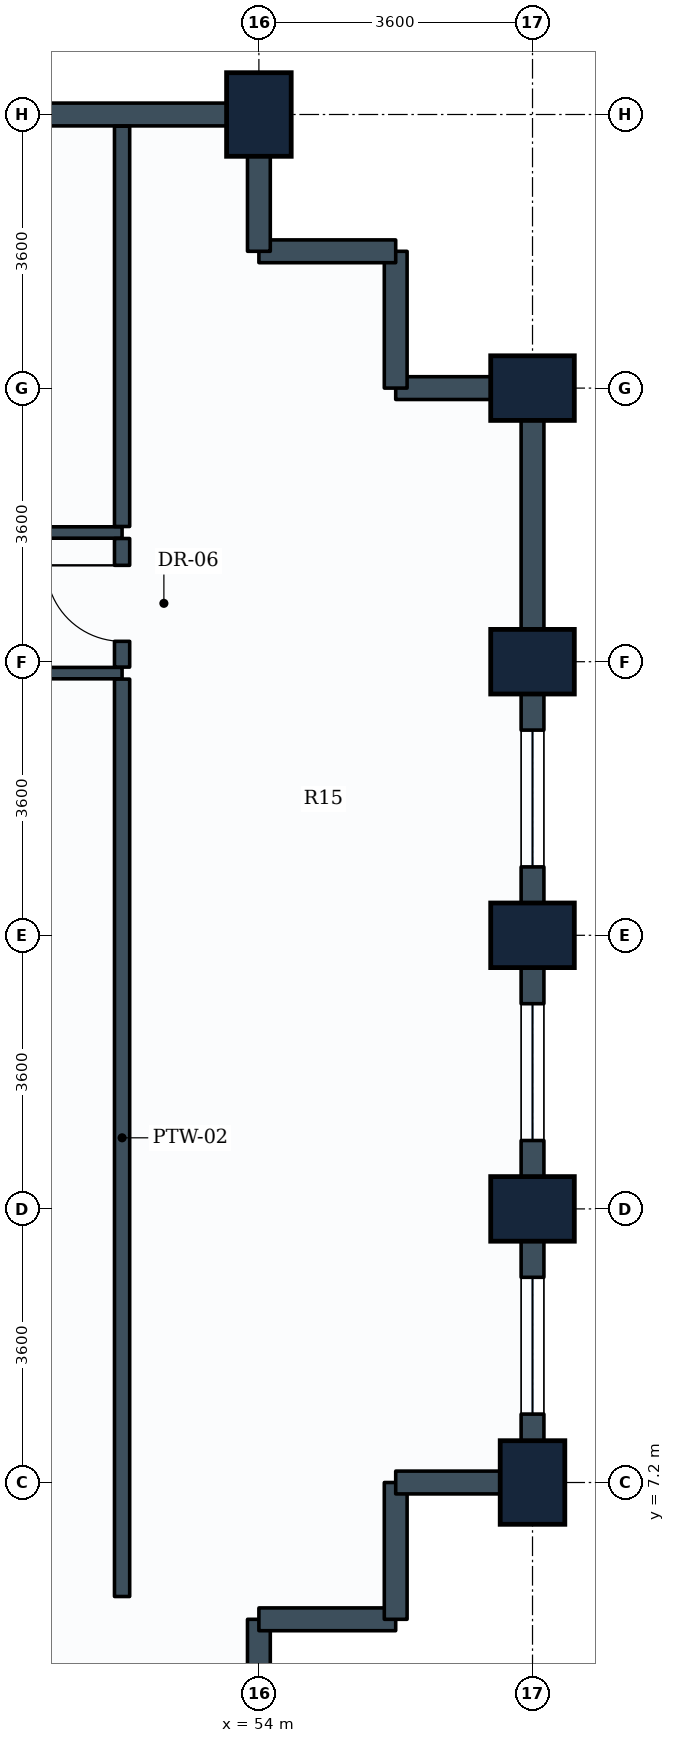
"""IFC4 building model, lengths in metres.
Left out: names, types, materials, properties, quantities, classifications, styles, units other than length and angle.
Written with IfcOpenShell. Run it as: python <this file> out.ifc"""

import sys

from ifc_helpers import new_model, si_unit, direction, frame, frame_2d, origin, origin_2d, place, context, subcontext, project, spatial, rectangle, extrude, element, fill, save


model = new_model("IFC4")
c1 = context("Model", 3, precision=1e-05, world=origin(), true_north=direction((0.0, 1.0)))
c2 = subcontext(c1, "Body", "Model", "MODEL_VIEW")
j1 = project(units=[si_unit("LENGTHUNIT", "METRE"), si_unit("PLANEANGLEUNIT", "RADIAN")], contexts=[c1])
p1 = place(None, origin())
s1 = spatial("IfcSite", under=j1, at=p1, CompositionType="ELEMENT")
p2 = place(p1, origin())
s2 = spatial("IfcBuilding", under=s1, at=p2, CompositionType="ELEMENT")
p3 = place(p2, frame((0.0, 0.0, 95.7)))
s3 = spatial("IfcBuildingStorey", under=s2, at=p3, CompositionType="ELEMENT", Elevation=95.7)
for number, where, z_axis, x_axis in (
    (1, (54.0, 25.2, 0.0), (0.0, 0.0, 1.0), (1.0, 0.0, 0.0)),
    (2, (57.6, 7.2, 0.0), (0.0, 0.0, 1.0), (1.0, 0.0, 0.0)),
    (3, (57.6, 10.8, 0.0), (0.0, 0.0, 1.0), (0.0, 1.0, 0.0)),
    (4, (57.6, 14.4, 0.0), (0.0, 0.0, 1.0), (0.0, 1.0, 0.0)),
    (5, (57.6, 18.0, 0.0), (0.0, 0.0, 1.0), (0.0, 1.0, 0.0)),
    (6, (57.6, 21.6, 0.0), (0.0, 0.0, 1.0), (0.0, 1.0, 0.0)),
):
    element("IfcColumn", number, at=place(p3, frame(where, z_axis=z_axis, x_axis=x_axis)), inside=s3, PredefinedType="COLUMN", context=c2, shape_type="SweptSolid", body=[
        extrude(rectangle(XDim=0.85, YDim=1.1, at=origin_2d()), origin(), (0.0, 0.0, 1.0), 3.9),
    ])
p4 = place(p3, frame((54.0, 5.4, 0.0), z_axis=(0.0, 0.0, 1.0), x_axis=(0.0, -1.0, 0.0)))
e7 = element("IfcWall", 7, at=p4, inside=s3, PredefinedType="STANDARD", context=c2, shape_type="SweptSolid", body=[
    extrude(rectangle(XDim=1.8, YDim=0.3, at=frame_2d((0.9, 0.0))), origin(), (0.0, 0.0, 1.0), 2.93),
])
for number, where, z_axis, x_axis in (
    (8, (55.8, 5.4, 0.0), (0.0, 0.0, 1.0), (-1.0, 0.0, 0.0)),
    (9, (55.8, 7.2, 0.0), (0.0, 0.0, 1.0), (0.0, -1.0, 0.0)),
):
    element("IfcWall", number, at=place(p3, frame(where, z_axis=z_axis, x_axis=x_axis)), inside=s3, PredefinedType="STANDARD", context=c2, shape_type="SweptSolid", body=[
        extrude(rectangle(XDim=1.8, YDim=0.3, at=frame_2d((0.9, 0.0))), origin(), (0.0, 0.0, 1.0), 3.635),
    ])
p5 = place(p3, frame((57.6, 7.2, 0.0), z_axis=(0.0, 0.0, 1.0), x_axis=(-1.0, 0.0, 0.0)))
e10 = element("IfcWall", 10, at=p5, inside=s3, PredefinedType="STANDARD", context=c2, shape_type="SweptSolid", body=[
    extrude(rectangle(XDim=1.8, YDim=0.3, at=frame_2d((0.9, 0.0))), origin(), (0.0, 0.0, 1.0), 2.93),
])
p6 = place(p3, frame((57.6, 10.8, 0.0), z_axis=(0.0, 0.0, 1.0), x_axis=(0.0, -1.0, 0.0)))
e11 = element("IfcWall", 11, at=p6, inside=s3, PredefinedType="STANDARD", context=c2, shape_type="SweptSolid", body=[
    extrude(rectangle(XDim=3.6, YDim=0.3, at=frame_2d((1.8, 0.0))), origin(), (0.0, 0.0, 1.0), 2.93),
])
p7 = place(p6, frame((0.9, 0.0, 0.85)))
e12 = element("IfcOpeningElement", 12, at=p7, cuts=e11, PredefinedType="OPENING", context=c2, shape_type="SweptSolid", body=[
    extrude(rectangle(XDim=1.8, YDim=1.35, at=frame_2d((0.9, 0.675))), frame((0.0, 0.16, 0.0), z_axis=(0.0, -1.0, 0.0), x_axis=(1.0, 0.0, 0.0)), (0.0, 0.0, 1.0), 0.32),
])
p8 = place(p3, frame((57.6, 14.4, 0.0), z_axis=(0.0, 0.0, 1.0), x_axis=(0.0, -1.0, 0.0)))
e13 = element("IfcWall", 13, at=p8, inside=s3, PredefinedType="STANDARD", context=c2, shape_type="SweptSolid", body=[
    extrude(rectangle(XDim=3.6, YDim=0.3, at=frame_2d((1.8, 0.0))), origin(), (0.0, 0.0, 1.0), 2.93),
])
p9 = place(p8, frame((0.9, 0.0, 0.85)))
e14 = element("IfcOpeningElement", 14, at=p9, cuts=e13, PredefinedType="OPENING", context=c2, shape_type="SweptSolid", body=[
    extrude(rectangle(XDim=1.8, YDim=1.35, at=frame_2d((0.9, 0.675))), frame((0.0, 0.16, 0.0), z_axis=(0.0, -1.0, 0.0), x_axis=(1.0, 0.0, 0.0)), (0.0, 0.0, 1.0), 0.32),
])
p10 = place(p3, frame((57.6, 18.0, 0.0), z_axis=(0.0, 0.0, 1.0), x_axis=(0.0, -1.0, 0.0)))
e15 = element("IfcWall", 15, at=p10, inside=s3, PredefinedType="STANDARD", context=c2, shape_type="SweptSolid", body=[
    extrude(rectangle(XDim=3.6, YDim=0.3, at=frame_2d((1.8, 0.0))), origin(), (0.0, 0.0, 1.0), 2.93),
])
p11 = place(p10, frame((0.9, 0.0, 0.85)))
e16 = element("IfcOpeningElement", 16, at=p11, cuts=e15, PredefinedType="OPENING", context=c2, shape_type="SweptSolid", body=[
    extrude(rectangle(XDim=1.8, YDim=1.35, at=frame_2d((0.9, 0.675))), frame((0.0, 0.16, 0.0), z_axis=(0.0, -1.0, 0.0), x_axis=(1.0, 0.0, 0.0)), (0.0, 0.0, 1.0), 0.32),
])
p12 = place(p3, frame((57.6, 21.6, 0.0), z_axis=(0.0, 0.0, 1.0), x_axis=(0.0, -1.0, 0.0)))
e17 = element("IfcWall", 17, at=p12, inside=s3, PredefinedType="STANDARD", context=c2, shape_type="SweptSolid", body=[
    extrude(rectangle(XDim=3.6, YDim=0.3, at=frame_2d((1.8, 0.0))), origin(), (0.0, 0.0, 1.0), 2.93),
])
p13 = place(p3, frame((55.8, 21.6, 0.0), z_axis=(0.0, 0.0, 1.0), x_axis=(1.0, 0.0, 0.0)))
e18 = element("IfcWall", 18, at=p13, inside=s3, PredefinedType="STANDARD", context=c2, shape_type="SweptSolid", body=[
    extrude(rectangle(XDim=1.8, YDim=0.3, at=frame_2d((0.9, 0.0))), origin(), (0.0, 0.0, 1.0), 2.93),
])
p14 = place(p3, frame((55.8, 23.4, 0.0), z_axis=(0.0, 0.0, 1.0), x_axis=(0.0, -1.0, 0.0)))
e19 = element("IfcWall", 19, at=p14, inside=s3, PredefinedType="STANDARD", context=c2, shape_type="SweptSolid", body=[
    extrude(rectangle(XDim=1.8, YDim=0.3, at=frame_2d((0.9, 0.0))), origin(), (0.0, 0.0, 1.0), 3.635),
])
p15 = place(p3, frame((54.0, 23.4, 0.0), z_axis=(0.0, 0.0, 1.0), x_axis=(1.0, 0.0, 0.0)))
e20 = element("IfcWall", 20, at=p15, inside=s3, PredefinedType="STANDARD", context=c2, shape_type="SweptSolid", body=[
    extrude(rectangle(XDim=1.8, YDim=0.3, at=frame_2d((0.9, 0.0))), origin(), (0.0, 0.0, 1.0), 3.635),
])
p16 = place(p3, frame((54.0, 25.2, 0.0), z_axis=(0.0, 0.0, 1.0), x_axis=(0.0, -1.0, 0.0)))
e21 = element("IfcWall", 21, at=p16, inside=s3, PredefinedType="STANDARD", context=c2, shape_type="SweptSolid", body=[
    extrude(rectangle(XDim=1.8, YDim=0.3, at=frame_2d((0.9, 0.0))), origin(), (0.0, 0.0, 1.0), 2.93),
])
p17 = place(p3, frame((50.4, 25.2, 0.0), z_axis=(0.0, 0.0, 1.0), x_axis=(1.0, 0.0, 0.0)))
e22 = element("IfcWall", 22, at=p17, inside=s3, PredefinedType="STANDARD", context=c2, shape_type="SweptSolid", body=[
    extrude(rectangle(XDim=3.6, YDim=0.3, at=frame_2d((1.8, 0.0))), origin(), (0.0, 0.0, 1.0), 2.93),
])
p18 = place(p3, frame((41.429, 17.85, 0.0), z_axis=(0.0, 0.0, 1.0), x_axis=(1.0, 0.0, 0.0)))
e23 = element("IfcWall", 23, at=p18, inside=s3, PredefinedType="PARTITIONING", context=c2, shape_type="SweptSolid", body=[
    extrude(rectangle(XDim=10.771, YDim=0.15, at=frame_2d((5.385, 0.0))), origin(), (0.0, 0.0, 1.0), 3.18),
])
p19 = place(p18, frame((4.806, 0.0, 0.0)))
e24 = element("IfcOpeningElement", 24, at=p19, cuts=e23, PredefinedType="OPENING", context=c2, shape_type="SweptSolid", body=[
    extrude(rectangle(XDim=1.0, YDim=2.1, at=frame_2d((0.5, 1.05))), frame((0.0, 0.085, 0.0), z_axis=(0.0, -1.0, 0.0), x_axis=(1.0, 0.0, 0.0)), (0.0, 0.0, 1.0), 0.17),
])
p20 = place(p3, frame((45.679, 19.7, 0.0), z_axis=(0.0, 0.0, 1.0), x_axis=(1.0, 0.0, 0.0)))
e25 = element("IfcWall", 25, at=p20, inside=s3, PredefinedType="PARTITIONING", context=c2, shape_type="SweptSolid", body=[
    extrude(rectangle(XDim=6.521, YDim=0.15, at=frame_2d((3.26, 0.0))), origin(), (0.0, 0.0, 1.0), 3.19),
])
p21 = place(p20, frame((2.721, 0.0, 0.0)))
e26 = element("IfcOpeningElement", 26, at=p21, cuts=e25, PredefinedType="OPENING", context=c2, shape_type="SweptSolid", body=[
    extrude(rectangle(XDim=1.0, YDim=2.1, at=frame_2d((0.5, 1.05))), frame((0.0, 0.085, 0.0), z_axis=(0.0, -1.0, 0.0), x_axis=(1.0, 0.0, 0.0)), (0.0, 0.0, 1.0), 0.17),
])
p22 = place(p3, frame((52.2, 5.7, 0.0), z_axis=(0.0, 0.0, 1.0), x_axis=(0.0, 1.0, 0.0)))
e27 = element("IfcWall", 27, at=p22, inside=s3, PredefinedType="PARTITIONING", context=c2, shape_type="SweptSolid", body=[
    extrude(rectangle(XDim=12.071, YDim=0.2, at=frame_2d((6.036, 0.0))), origin(), (0.0, 0.0, 1.0), 3.18),
])
p23 = place(p3, frame((52.2, 19.779, 0.0), z_axis=(0.0, 0.0, 1.0), x_axis=(0.0, 1.0, 0.0)))
e28 = element("IfcWall", 28, at=p23, inside=s3, PredefinedType="PARTITIONING", context=c2, shape_type="SweptSolid", body=[
    extrude(rectangle(XDim=5.267, YDim=0.2, at=frame_2d((2.633, 0.0))), origin(), (0.0, 0.0, 1.0), 2.93),
])
p24 = place(p3, frame((52.2, 17.929, 0.0), z_axis=(0.0, 0.0, 1.0), x_axis=(0.0, 1.0, 0.0)))
e29 = element("IfcWall", 29, at=p24, inside=s3, PredefinedType="PARTITIONING", context=c2, shape_type="SweptSolid", body=[
    extrude(rectangle(XDim=1.692, YDim=0.2, at=frame_2d((0.846, 0.0))), origin(), (0.0, 0.0, 1.0), 3.635),
])
p25 = place(p24, frame((0.339, 0.0, 0.0)))
e30 = element("IfcOpeningElement", 30, at=p25, cuts=e29, PredefinedType="OPENING", context=c2, shape_type="SweptSolid", body=[
    extrude(rectangle(XDim=1.0, YDim=2.1, at=frame_2d((0.5, 1.05))), frame((0.0, 0.11, 0.0), z_axis=(0.0, -1.0, 0.0), x_axis=(1.0, 0.0, 0.0)), (0.0, 0.0, 1.0), 0.22),
])
p26 = place(p7, origin())
e31 = element("IfcWindow", 31, at=p26, inside=s3, PartitioningType="SINGLE_PANEL", PredefinedType="WINDOW", context=c2, shape_type="SweptSolid", body=[
    extrude(rectangle(XDim=1.8, YDim=1.35, at=frame_2d((0.9, 0.675))), frame((0.0, 0.03, 0.0), z_axis=(0.0, -1.0, 0.0), x_axis=(1.0, 0.0, 0.0)), (0.0, 0.0, 1.0), 0.06),
])
fill(e12, e31)
p27 = place(p9, origin())
e32 = element("IfcWindow", 32, at=p27, inside=s3, PartitioningType="SINGLE_PANEL", PredefinedType="WINDOW", context=c2, shape_type="SweptSolid", body=[
    extrude(rectangle(XDim=1.8, YDim=1.35, at=frame_2d((0.9, 0.675))), frame((0.0, 0.03, 0.0), z_axis=(0.0, -1.0, 0.0), x_axis=(1.0, 0.0, 0.0)), (0.0, 0.0, 1.0), 0.06),
])
fill(e14, e32)
p28 = place(p11, origin())
e33 = element("IfcWindow", 33, at=p28, inside=s3, PartitioningType="SINGLE_PANEL", PredefinedType="WINDOW", context=c2, shape_type="SweptSolid", body=[
    extrude(rectangle(XDim=1.8, YDim=1.35, at=frame_2d((0.9, 0.675))), frame((0.0, 0.03, 0.0), z_axis=(0.0, -1.0, 0.0), x_axis=(1.0, 0.0, 0.0)), (0.0, 0.0, 1.0), 0.06),
])
fill(e16, e33)
p29 = place(p25, origin())
e34 = element("IfcDoor", 34, at=p29, inside=s3, OperationType="SINGLE_SWING_RIGHT", PredefinedType="DOOR", context=c2, shape_type="SweptSolid", body=[
    extrude(rectangle(XDim=1.0, YDim=2.1, at=frame_2d((0.5, 1.05))), frame((0.0, 0.025, 0.0), z_axis=(0.0, -1.0, 0.0), x_axis=(1.0, 0.0, 0.0)), (0.0, 0.0, 1.0), 0.05),
])
fill(e30, e34)
save(model, sys.argv[1])
